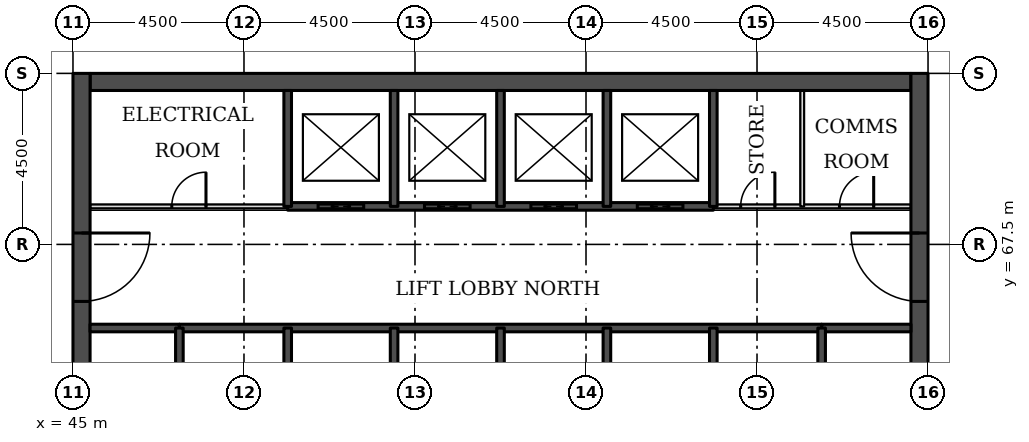
"""IFC4 building model, lengths in metres.
Left out: names, types, materials, properties, quantities, classifications, styles, units other than length and angle.
Written with IfcOpenShell. Run it as: python <this file> out.ifc"""

import sys

from ifc_helpers import new_model, si_unit, direction, frame, frame_2d, origin, place, context, subcontext, project, spatial, rectangle, extrude, element, fill, save


model = new_model("IFC4")
c1 = context("Model", 3, precision=1e-05, world=origin(), true_north=direction((0.0, 1.0)))
c2 = subcontext(c1, "Body", "Model", "MODEL_VIEW")
j1 = project(units=[si_unit("LENGTHUNIT", "METRE"), si_unit("PLANEANGLEUNIT", "RADIAN")], contexts=[c1])
p1 = place(None, origin())
s1 = spatial("IfcSite", under=j1, at=p1, CompositionType="ELEMENT")
p2 = place(p1, origin())
s2 = spatial("IfcBuilding", under=s1, at=p2, CompositionType="ELEMENT")
p3 = place(p2, frame((0.0, 0.0, 134.4)))
s3 = spatial("IfcBuildingStorey", under=s2, at=p3, CompositionType="ELEMENT", Elevation=134.4)
p4 = place(p3, frame((45.45, 71.775, 0.0), z_axis=(0.0, 0.0, 1.0), x_axis=(1.0, 0.0, 0.0)))
e1 = element("IfcWall", 1, at=p4, inside=s3, PredefinedType="SHEAR", context=c2, shape_type="SweptSolid", body=[
    extrude(rectangle(XDim=21.6, YDim=0.45, at=frame_2d((10.8, 0.0))), origin(), (0.0, 0.0, 1.0), 3.7),
])
p5 = place(p3, frame((45.225, 49.5, 0.0), z_axis=(0.0, 0.0, 1.0), x_axis=(0.0, 1.0, 0.0)))
e2 = element("IfcWall", 2, at=p5, inside=s3, PredefinedType="SHEAR", context=c2, shape_type="SweptSolid", body=[
    extrude(rectangle(XDim=22.5, YDim=0.45, at=frame_2d((11.25, 0.0))), origin(), (0.0, 0.0, 1.0), 3.7),
])
p6 = place(p5, frame((4.2, 0.0, 0.0)))
e3 = element("IfcOpeningElement", 3, at=p6, cuts=e2, PredefinedType="OPENING", context=c2, shape_type="SweptSolid", body=[
    extrude(rectangle(XDim=1.8, YDim=2.1, at=frame_2d((0.9, 1.05))), frame((0.0, 0.235, 0.0), z_axis=(0.0, -1.0, 0.0), x_axis=(1.0, 0.0, 0.0)), (0.0, 0.0, 1.0), 0.47),
])
p7 = place(p5, frame((6.9, 0.0, 0.0)))
e4 = element("IfcOpeningElement", 4, at=p7, cuts=e2, PredefinedType="OPENING", context=c2, shape_type="SweptSolid", body=[
    extrude(rectangle(XDim=1.1, YDim=2.1, at=frame_2d((0.55, 1.05))), frame((0.0, 0.235, 0.0), z_axis=(0.0, -1.0, 0.0), x_axis=(1.0, 0.0, 0.0)), (0.0, 0.0, 1.0), 0.47),
])
p8 = place(p5, frame((13.6, 0.0, 0.0)))
e5 = element("IfcOpeningElement", 5, at=p8, cuts=e2, PredefinedType="OPENING", context=c2, shape_type="SweptSolid", body=[
    extrude(rectangle(XDim=1.1, YDim=2.1, at=frame_2d((0.55, 1.05))), frame((0.0, 0.235, 0.0), z_axis=(0.0, -1.0, 0.0), x_axis=(1.0, 0.0, 0.0)), (0.0, 0.0, 1.0), 0.47),
])
p9 = place(p5, frame((16.5, 0.0, 0.0)))
e6 = element("IfcOpeningElement", 6, at=p9, cuts=e2, PredefinedType="OPENING", context=c2, shape_type="SweptSolid", body=[
    extrude(rectangle(XDim=1.8, YDim=2.1, at=frame_2d((0.9, 1.05))), frame((0.0, 0.235, 0.0), z_axis=(0.0, -1.0, 0.0), x_axis=(1.0, 0.0, 0.0)), (0.0, 0.0, 1.0), 0.47),
])
p10 = place(p3, frame((67.275, 49.5, 0.0), z_axis=(0.0, 0.0, 1.0), x_axis=(0.0, 1.0, 0.0)))
e7 = element("IfcWall", 7, at=p10, inside=s3, PredefinedType="SHEAR", context=c2, shape_type="SweptSolid", body=[
    extrude(rectangle(XDim=22.5, YDim=0.45, at=frame_2d((11.25, 0.0))), origin(), (0.0, 0.0, 1.0), 3.7),
])
p11 = place(p10, frame((4.2, 0.0, 0.0)))
e8 = element("IfcOpeningElement", 8, at=p11, cuts=e7, PredefinedType="OPENING", context=c2, shape_type="SweptSolid", body=[
    extrude(rectangle(XDim=1.8, YDim=2.1, at=frame_2d((0.9, 1.05))), frame((0.0, 0.235, 0.0), z_axis=(0.0, -1.0, 0.0), x_axis=(1.0, 0.0, 0.0)), (0.0, 0.0, 1.0), 0.47),
])
p12 = place(p10, frame((6.9, 0.0, 0.0)))
e9 = element("IfcOpeningElement", 9, at=p12, cuts=e7, PredefinedType="OPENING", context=c2, shape_type="SweptSolid", body=[
    extrude(rectangle(XDim=1.1, YDim=2.1, at=frame_2d((0.55, 1.05))), frame((0.0, 0.235, 0.0), z_axis=(0.0, -1.0, 0.0), x_axis=(1.0, 0.0, 0.0)), (0.0, 0.0, 1.0), 0.47),
])
p13 = place(p10, frame((13.6, 0.0, 0.0)))
e10 = element("IfcOpeningElement", 10, at=p13, cuts=e7, PredefinedType="OPENING", context=c2, shape_type="SweptSolid", body=[
    extrude(rectangle(XDim=1.1, YDim=2.1, at=frame_2d((0.55, 1.05))), frame((0.0, 0.235, 0.0), z_axis=(0.0, -1.0, 0.0), x_axis=(1.0, 0.0, 0.0)), (0.0, 0.0, 1.0), 0.47),
])
p14 = place(p10, frame((16.5, 0.0, 0.0)))
e11 = element("IfcOpeningElement", 11, at=p14, cuts=e7, PredefinedType="OPENING", context=c2, shape_type="SweptSolid", body=[
    extrude(rectangle(XDim=1.8, YDim=2.1, at=frame_2d((0.9, 1.05))), frame((0.0, 0.235, 0.0), z_axis=(0.0, -1.0, 0.0), x_axis=(1.0, 0.0, 0.0)), (0.0, 0.0, 1.0), 0.47),
])
for number, where, z_axis, x_axis in (
    (12, (45.45, 65.3, 0.0), (0.0, 0.0, 1.0), (1.0, 0.0, 0.0)),
    (13, (64.7, 65.3, 0.0), (0.0, 0.0, 1.0), (1.0, 0.0, 0.0)),
):
    element("IfcWall", number, at=place(p3, frame(where, z_axis=z_axis, x_axis=x_axis)), inside=s3, PredefinedType="SOLIDWALL", context=c2, shape_type="SweptSolid", body=[
        extrude(rectangle(XDim=2.35, YDim=0.2, at=frame_2d((1.175, 0.0))), origin(), (0.0, 0.0, 1.0), 3.55),
    ])
p15 = place(p3, frame((47.8, 65.3, 0.0), z_axis=(0.0, 0.0, 1.0), x_axis=(1.0, 0.0, 0.0)))
e14 = element("IfcWall", 14, at=p15, inside=s3, PredefinedType="SOLIDWALL", context=c2, shape_type="SweptSolid", body=[
    extrude(rectangle(XDim=16.9, YDim=0.2, at=frame_2d((8.45, 0.0))), origin(), (0.0, 0.0, 1.0), 3.55),
])
p16 = place(p3, frame((45.45, 68.5, 0.0), z_axis=(0.0, 0.0, 1.0), x_axis=(1.0, 0.0, 0.0)))
e15 = element("IfcWall", 15, at=p16, inside=s3, PredefinedType="PARTITIONING", context=c2, shape_type="SweptSolid", body=[
    extrude(rectangle(XDim=5.2, YDim=0.1, at=frame_2d((2.6, 0.0))), origin(), (0.0, 0.0, 1.0), 3.55),
])
p17 = place(p16, frame((2.15, 0.0, 0.0)))
e16 = element("IfcOpeningElement", 16, at=p17, cuts=e15, PredefinedType="OPENING", context=c2, shape_type="SweptSolid", body=[
    extrude(rectangle(XDim=0.9, YDim=2.1, at=frame_2d((0.45, 1.05))), frame((0.0, 0.06, 0.0), z_axis=(0.0, -1.0, 0.0), x_axis=(1.0, 0.0, 0.0)), (0.0, 0.0, 1.0), 0.12),
])
p18 = place(p3, frame((61.85, 68.5, 0.0), z_axis=(0.0, 0.0, 1.0), x_axis=(1.0, 0.0, 0.0)))
e17 = element("IfcWall", 17, at=p18, inside=s3, PredefinedType="PARTITIONING", context=c2, shape_type="SweptSolid", body=[
    extrude(rectangle(XDim=5.2, YDim=0.1, at=frame_2d((2.6, 0.0))), origin(), (0.0, 0.0, 1.0), 3.55),
])
p19 = place(p18, frame((3.32, 0.0, 0.0)))
e18 = element("IfcOpeningElement", 18, at=p19, cuts=e17, PredefinedType="OPENING", context=c2, shape_type="SweptSolid", body=[
    extrude(rectangle(XDim=0.9, YDim=2.1, at=frame_2d((0.45, 1.05))), frame((0.0, 0.06, 0.0), z_axis=(0.0, -1.0, 0.0), x_axis=(1.0, 0.0, 0.0)), (0.0, 0.0, 1.0), 0.12),
])
p20 = place(p18, frame((0.72, 0.0, 0.0)))
e19 = element("IfcOpeningElement", 19, at=p20, cuts=e17, PredefinedType="OPENING", context=c2, shape_type="SweptSolid", body=[
    extrude(rectangle(XDim=0.9, YDim=2.1, at=frame_2d((0.45, 1.05))), frame((0.0, 0.06, 0.0), z_axis=(0.0, -1.0, 0.0), x_axis=(1.0, 0.0, 0.0)), (0.0, 0.0, 1.0), 0.12),
])
p21 = place(p3, frame((50.65, 68.5, 0.0), z_axis=(0.0, 0.0, 1.0), x_axis=(1.0, 0.0, 0.0)))
e20 = element("IfcWall", 20, at=p21, inside=s3, PredefinedType="SOLIDWALL", context=c2, shape_type="SweptSolid", body=[
    extrude(rectangle(XDim=11.2, YDim=0.2, at=frame_2d((5.6, 0.0))), origin(), (0.0, 0.0, 1.0), 3.55),
])
p22 = place(p21, frame((0.8, 0.0, 0.0)))
e21 = element("IfcOpeningElement", 21, at=p22, cuts=e20, PredefinedType="OPENING", context=c2, shape_type="SweptSolid", body=[
    extrude(rectangle(XDim=1.2, YDim=2.1, at=frame_2d((0.6, 1.05))), frame((0.0, 0.11, 0.0), z_axis=(0.0, -1.0, 0.0), x_axis=(1.0, 0.0, 0.0)), (0.0, 0.0, 1.0), 0.22),
])
p23 = place(p21, frame((3.6, 0.0, 0.0)))
e22 = element("IfcOpeningElement", 22, at=p23, cuts=e20, PredefinedType="OPENING", context=c2, shape_type="SweptSolid", body=[
    extrude(rectangle(XDim=1.2, YDim=2.1, at=frame_2d((0.6, 1.05))), frame((0.0, 0.11, 0.0), z_axis=(0.0, -1.0, 0.0), x_axis=(1.0, 0.0, 0.0)), (0.0, 0.0, 1.0), 0.22),
])
p24 = place(p21, frame((6.4, 0.0, 0.0)))
e23 = element("IfcOpeningElement", 23, at=p24, cuts=e20, PredefinedType="OPENING", context=c2, shape_type="SweptSolid", body=[
    extrude(rectangle(XDim=1.2, YDim=2.1, at=frame_2d((0.6, 1.05))), frame((0.0, 0.11, 0.0), z_axis=(0.0, -1.0, 0.0), x_axis=(1.0, 0.0, 0.0)), (0.0, 0.0, 1.0), 0.22),
])
p25 = place(p21, frame((9.2, 0.0, 0.0)))
e24 = element("IfcOpeningElement", 24, at=p25, cuts=e20, PredefinedType="OPENING", context=c2, shape_type="SweptSolid", body=[
    extrude(rectangle(XDim=1.2, YDim=2.1, at=frame_2d((0.6, 1.05))), frame((0.0, 0.11, 0.0), z_axis=(0.0, -1.0, 0.0), x_axis=(1.0, 0.0, 0.0)), (0.0, 0.0, 1.0), 0.22),
])
p26 = place(p3, frame((47.8, 62.0, 0.0), z_axis=(0.0, 0.0, 1.0), x_axis=(0.0, 1.0, 0.0)))
e25 = element("IfcWall", 25, at=p26, inside=s3, PredefinedType="SOLIDWALL", context=c2, shape_type="SweptSolid", body=[
    extrude(rectangle(XDim=3.3, YDim=0.2, at=frame_2d((1.65, 0.0))), origin(), (0.0, 0.0, 1.0), 3.55),
])
p27 = place(p26, frame((1.1, 0.0, 0.0)))
e26 = element("IfcOpeningElement", 26, at=p27, cuts=e25, PredefinedType="OPENING", context=c2, shape_type="SweptSolid", body=[
    extrude(rectangle(XDim=1.1, YDim=2.1, at=frame_2d((0.55, 1.05))), frame((0.0, 0.11, 0.0), z_axis=(0.0, -1.0, 0.0), x_axis=(1.0, 0.0, 0.0)), (0.0, 0.0, 1.0), 0.22),
])
p28 = place(p3, frame((50.65, 62.0, 0.0), z_axis=(0.0, 0.0, 1.0), x_axis=(0.0, 1.0, 0.0)))
e27 = element("IfcWall", 27, at=p28, inside=s3, PredefinedType="SOLIDWALL", context=c2, shape_type="SweptSolid", body=[
    extrude(rectangle(XDim=3.3, YDim=0.2, at=frame_2d((1.65, 0.0))), origin(), (0.0, 0.0, 1.0), 3.55),
])
p29 = place(p3, frame((50.65, 68.5, 0.0), z_axis=(0.0, 0.0, 1.0), x_axis=(0.0, 1.0, 0.0)))
e28 = element("IfcWall", 28, at=p29, inside=s3, PredefinedType="SOLIDWALL", context=c2, shape_type="SweptSolid", body=[
    extrude(rectangle(XDim=3.05, YDim=0.2, at=frame_2d((1.525, 0.0))), origin(), (0.0, 0.0, 1.0), 3.55),
])
p30 = place(p3, frame((53.45, 62.5, 0.0), z_axis=(0.0, 0.0, 1.0), x_axis=(0.0, 1.0, 0.0)))
e29 = element("IfcWall", 29, at=p30, inside=s3, PredefinedType="SOLIDWALL", context=c2, shape_type="SweptSolid", body=[
    extrude(rectangle(XDim=2.8, YDim=0.2, at=frame_2d((1.4, 0.0))), origin(), (0.0, 0.0, 1.0), 3.55),
])
p31 = place(p3, frame((53.45, 68.5, 0.0), z_axis=(0.0, 0.0, 1.0), x_axis=(0.0, 1.0, 0.0)))
e30 = element("IfcWall", 30, at=p31, inside=s3, PredefinedType="SOLIDWALL", context=c2, shape_type="SweptSolid", body=[
    extrude(rectangle(XDim=3.05, YDim=0.2, at=frame_2d((1.525, 0.0))), origin(), (0.0, 0.0, 1.0), 3.55),
])
p32 = place(p3, frame((56.25, 62.5, 0.0), z_axis=(0.0, 0.0, 1.0), x_axis=(0.0, 1.0, 0.0)))
e31 = element("IfcWall", 31, at=p32, inside=s3, PredefinedType="SOLIDWALL", context=c2, shape_type="SweptSolid", body=[
    extrude(rectangle(XDim=2.8, YDim=0.2, at=frame_2d((1.4, 0.0))), origin(), (0.0, 0.0, 1.0), 3.55),
])
p33 = place(p3, frame((56.25, 68.5, 0.0), z_axis=(0.0, 0.0, 1.0), x_axis=(0.0, 1.0, 0.0)))
e32 = element("IfcWall", 32, at=p33, inside=s3, PredefinedType="SOLIDWALL", context=c2, shape_type="SweptSolid", body=[
    extrude(rectangle(XDim=3.05, YDim=0.2, at=frame_2d((1.525, 0.0))), origin(), (0.0, 0.0, 1.0), 3.55),
])
p34 = place(p3, frame((59.05, 62.5, 0.0), z_axis=(0.0, 0.0, 1.0), x_axis=(0.0, 1.0, 0.0)))
e33 = element("IfcWall", 33, at=p34, inside=s3, PredefinedType="SOLIDWALL", context=c2, shape_type="SweptSolid", body=[
    extrude(rectangle(XDim=2.8, YDim=0.2, at=frame_2d((1.4, 0.0))), origin(), (0.0, 0.0, 1.0), 3.55),
])
p35 = place(p3, frame((59.05, 68.5, 0.0), z_axis=(0.0, 0.0, 1.0), x_axis=(0.0, 1.0, 0.0)))
e34 = element("IfcWall", 34, at=p35, inside=s3, PredefinedType="SOLIDWALL", context=c2, shape_type="SweptSolid", body=[
    extrude(rectangle(XDim=3.05, YDim=0.2, at=frame_2d((1.525, 0.0))), origin(), (0.0, 0.0, 1.0), 3.55),
])
p36 = place(p3, frame((61.85, 62.0, 0.0), z_axis=(0.0, 0.0, 1.0), x_axis=(0.0, 1.0, 0.0)))
e35 = element("IfcWall", 35, at=p36, inside=s3, PredefinedType="SOLIDWALL", context=c2, shape_type="SweptSolid", body=[
    extrude(rectangle(XDim=3.3, YDim=0.2, at=frame_2d((1.65, 0.0))), origin(), (0.0, 0.0, 1.0), 3.55),
])
p37 = place(p3, frame((61.85, 68.5, 0.0), z_axis=(0.0, 0.0, 1.0), x_axis=(0.0, 1.0, 0.0)))
e36 = element("IfcWall", 36, at=p37, inside=s3, PredefinedType="SOLIDWALL", context=c2, shape_type="SweptSolid", body=[
    extrude(rectangle(XDim=3.05, YDim=0.2, at=frame_2d((1.525, 0.0))), origin(), (0.0, 0.0, 1.0), 3.55),
])
p38 = place(p3, frame((64.19, 68.5, 0.0), z_axis=(0.0, 0.0, 1.0), x_axis=(0.0, 1.0, 0.0)))
e37 = element("IfcWall", 37, at=p38, inside=s3, PredefinedType="PARTITIONING", context=c2, shape_type="SweptSolid", body=[
    extrude(rectangle(XDim=3.05, YDim=0.1, at=frame_2d((1.525, 0.0))), origin(), (0.0, 0.0, 1.0), 3.55),
])
p39 = place(p3, frame((64.7, 62.0, 0.0), z_axis=(0.0, 0.0, 1.0), x_axis=(0.0, 1.0, 0.0)))
e38 = element("IfcWall", 38, at=p39, inside=s3, PredefinedType="SOLIDWALL", context=c2, shape_type="SweptSolid", body=[
    extrude(rectangle(XDim=3.3, YDim=0.2, at=frame_2d((1.65, 0.0))), origin(), (0.0, 0.0, 1.0), 3.55),
])
p40 = place(p39, frame((1.1, 0.0, 0.0)))
e39 = element("IfcOpeningElement", 39, at=p40, cuts=e38, PredefinedType="OPENING", context=c2, shape_type="SweptSolid", body=[
    extrude(rectangle(XDim=1.1, YDim=2.1, at=frame_2d((0.55, 1.05))), frame((0.0, 0.11, 0.0), z_axis=(0.0, -1.0, 0.0), x_axis=(1.0, 0.0, 0.0)), (0.0, 0.0, 1.0), 0.22),
])
p41 = place(p22, origin())
e40 = element("IfcDoor", 40, at=p41, inside=s3, OperationType="DOUBLE_DOOR_SLIDING", PredefinedType="DOOR", context=c2, shape_type="SweptSolid", body=[
    extrude(rectangle(XDim=1.2, YDim=2.1, at=frame_2d((0.6, 1.05))), frame((0.0, 0.025, 0.0), z_axis=(0.0, -1.0, 0.0), x_axis=(1.0, 0.0, 0.0)), (0.0, 0.0, 1.0), 0.05),
])
fill(e21, e40)
p42 = place(p23, origin())
e41 = element("IfcDoor", 41, at=p42, inside=s3, OperationType="DOUBLE_DOOR_SLIDING", PredefinedType="DOOR", context=c2, shape_type="SweptSolid", body=[
    extrude(rectangle(XDim=1.2, YDim=2.1, at=frame_2d((0.6, 1.05))), frame((0.0, 0.025, 0.0), z_axis=(0.0, -1.0, 0.0), x_axis=(1.0, 0.0, 0.0)), (0.0, 0.0, 1.0), 0.05),
])
fill(e22, e41)
p43 = place(p24, origin())
e42 = element("IfcDoor", 42, at=p43, inside=s3, OperationType="DOUBLE_DOOR_SLIDING", PredefinedType="DOOR", context=c2, shape_type="SweptSolid", body=[
    extrude(rectangle(XDim=1.2, YDim=2.1, at=frame_2d((0.6, 1.05))), frame((0.0, 0.025, 0.0), z_axis=(0.0, -1.0, 0.0), x_axis=(1.0, 0.0, 0.0)), (0.0, 0.0, 1.0), 0.05),
])
fill(e23, e42)
p44 = place(p25, origin())
e43 = element("IfcDoor", 43, at=p44, inside=s3, OperationType="DOUBLE_DOOR_SLIDING", PredefinedType="DOOR", context=c2, shape_type="SweptSolid", body=[
    extrude(rectangle(XDim=1.2, YDim=2.1, at=frame_2d((0.6, 1.05))), frame((0.0, 0.025, 0.0), z_axis=(0.0, -1.0, 0.0), x_axis=(1.0, 0.0, 0.0)), (0.0, 0.0, 1.0), 0.05),
])
fill(e24, e43)
p45 = place(p9, frame((1.8, 0.0, 0.0), z_axis=(0.0, 0.0, 1.0), x_axis=(-1.0, 0.0, 0.0)))
e44 = element("IfcDoor", 44, at=p45, inside=s3, OperationType="SINGLE_SWING_LEFT", PredefinedType="DOOR", context=c2, shape_type="SweptSolid", body=[
    extrude(rectangle(XDim=1.8, YDim=2.1, at=frame_2d((0.9, 1.05))), frame((0.0, 0.025, 0.0), z_axis=(0.0, -1.0, 0.0), x_axis=(1.0, 0.0, 0.0)), (0.0, 0.0, 1.0), 0.05),
])
fill(e6, e44)
p46 = place(p14, origin())
e45 = element("IfcDoor", 45, at=p46, inside=s3, OperationType="SINGLE_SWING_RIGHT", PredefinedType="DOOR", context=c2, shape_type="SweptSolid", body=[
    extrude(rectangle(XDim=1.8, YDim=2.1, at=frame_2d((0.9, 1.05))), frame((0.0, 0.025, 0.0), z_axis=(0.0, -1.0, 0.0), x_axis=(1.0, 0.0, 0.0)), (0.0, 0.0, 1.0), 0.05),
])
fill(e11, e45)
p47 = place(p19, origin())
e46 = element("IfcDoor", 46, at=p47, inside=s3, OperationType="SINGLE_SWING_RIGHT", PredefinedType="DOOR", context=c2, shape_type="SweptSolid", body=[
    extrude(rectangle(XDim=0.9, YDim=2.1, at=frame_2d((0.45, 1.05))), frame((0.0, 0.025, 0.0), z_axis=(0.0, -1.0, 0.0), x_axis=(1.0, 0.0, 0.0)), (0.0, 0.0, 1.0), 0.05),
])
fill(e18, e46)
p48 = place(p20, origin())
e47 = element("IfcDoor", 47, at=p48, inside=s3, OperationType="SINGLE_SWING_RIGHT", PredefinedType="DOOR", context=c2, shape_type="SweptSolid", body=[
    extrude(rectangle(XDim=0.9, YDim=2.1, at=frame_2d((0.45, 1.05))), frame((0.0, 0.025, 0.0), z_axis=(0.0, -1.0, 0.0), x_axis=(1.0, 0.0, 0.0)), (0.0, 0.0, 1.0), 0.05),
])
fill(e19, e47)
p49 = place(p17, origin())
e48 = element("IfcDoor", 48, at=p49, inside=s3, OperationType="SINGLE_SWING_RIGHT", PredefinedType="DOOR", context=c2, shape_type="SweptSolid", body=[
    extrude(rectangle(XDim=0.9, YDim=2.1, at=frame_2d((0.45, 1.05))), frame((0.0, 0.025, 0.0), z_axis=(0.0, -1.0, 0.0), x_axis=(1.0, 0.0, 0.0)), (0.0, 0.0, 1.0), 0.05),
])
fill(e16, e48)
save(model, sys.argv[1])
